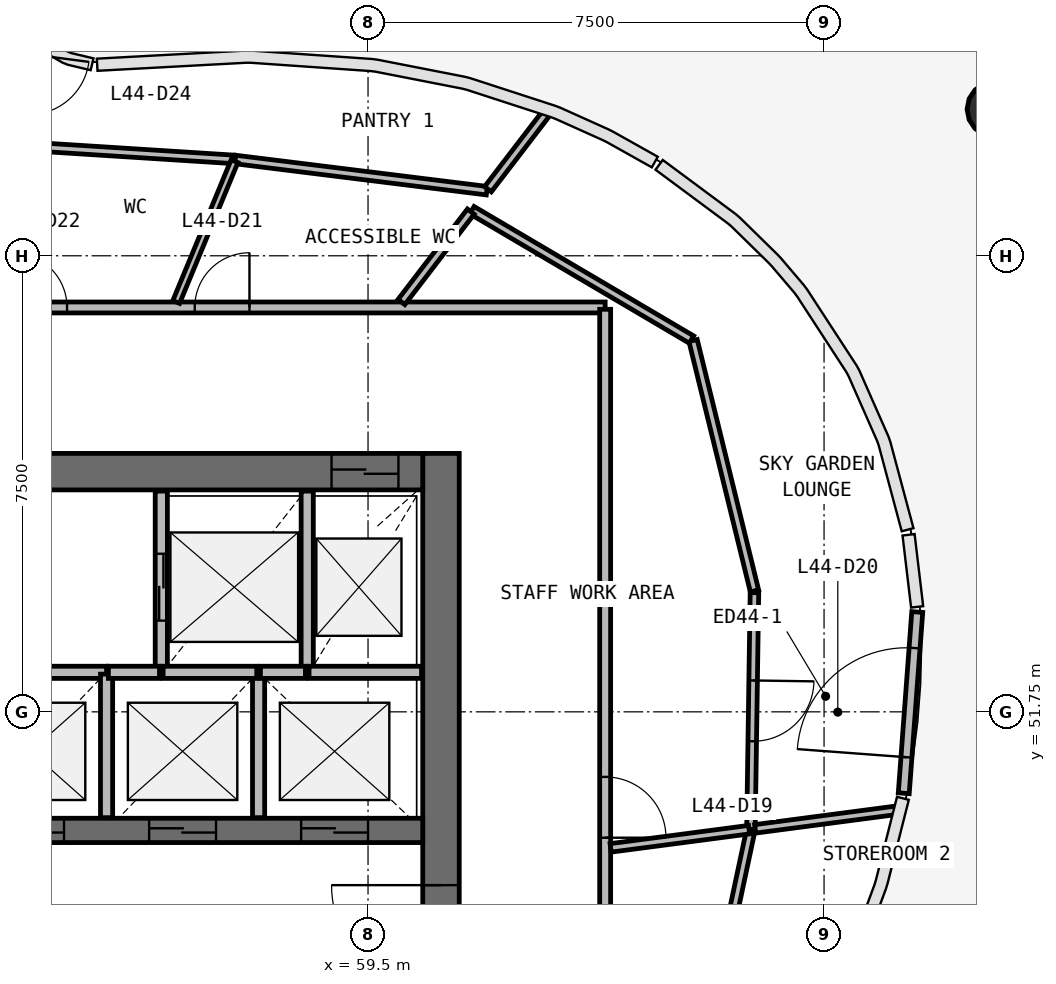
"""IFC4 building model, lengths in metres.
Left out: names, types, materials, properties, quantities, classifications, styles, units other than length and angle.
Written with IfcOpenShell. Run it as: python <this file> out.ifc"""

import sys

from ifc_helpers import new_model, si_unit, direction, frame, frame_2d, origin, origin_2d, place, context, subcontext, project, spatial, rectangle, circle, extrude, source, transform, mapped, element, fill, save


model = new_model("IFC4")
c1 = context("Model", 3, precision=1e-05, world=origin(), true_north=direction((0.0, 1.0)))
c2 = subcontext(c1, "Body", "Model", "MODEL_VIEW")
j1 = project(units=[si_unit("LENGTHUNIT", "METRE"), si_unit("PLANEANGLEUNIT", "RADIAN")], contexts=[c1])
p1 = place(None, origin())
s1 = spatial("IfcSite", under=j1, at=p1, CompositionType="ELEMENT")
p2 = place(p1, origin())
s2 = spatial("IfcBuilding", under=s1, at=p2, CompositionType="ELEMENT")
p3 = place(p2, frame((0.0, 0.0, 183.8)))
s3 = spatial("IfcBuildingStorey", under=s2, at=p3, CompositionType="ELEMENT", Elevation=183.8)
p4 = place(p3, frame((60.7, 40.0, 0.0), z_axis=(0.0, 0.0, 1.0), x_axis=(0.0, 1.0, 0.0)))
e1 = element("IfcWall", 1, at=p4, inside=s3, PredefinedType="SHEAR", context=c2, shape_type="SweptSolid", body=[
    extrude(rectangle(XDim=16.0, YDim=0.6, at=frame_2d((8.0, 0.0))), origin(), (0.0, 0.0, 1.0), 3.9),
])
p5 = place(p4, frame((7.1, 0.0, 0.0)))
e2 = element("IfcOpeningElement", 2, at=p5, cuts=e1, PredefinedType="OPENING", context=c2, shape_type="SweptSolid", body=[
    extrude(rectangle(XDim=1.8, YDim=2.1, at=frame_2d((0.9, 1.05))), frame((0.0, 0.31, 0.0), z_axis=(0.0, -1.0, 0.0), x_axis=(1.0, 0.0, 0.0)), (0.0, 0.0, 1.0), 0.62),
])
p6 = place(p3, frame((60.4, 55.7, 0.0), z_axis=(0.0, 0.0, 1.0), x_axis=(-1.0, 0.0, 0.0)))
e3 = element("IfcWall", 3, at=p6, inside=s3, PredefinedType="SHEAR", context=c2, shape_type="SweptSolid", body=[
    extrude(rectangle(XDim=16.8, YDim=0.6, at=frame_2d((8.4, 0.0))), origin(), (0.0, 0.0, 1.0), 3.9),
])
p7 = place(p6, frame((0.4, 0.0, 0.0)))
e4 = element("IfcOpeningElement", 4, at=p7, cuts=e3, PredefinedType="OPENING", context=c2, shape_type="SweptSolid", body=[
    extrude(rectangle(XDim=1.1, YDim=2.1, at=frame_2d((0.55, 1.05))), frame((0.0, 0.31, 0.0), z_axis=(0.0, -1.0, 0.0), x_axis=(1.0, 0.0, 0.0)), (0.0, 0.0, 1.0), 0.62),
])
p8 = place(p6, frame((10.3, 0.0, 0.0)))
e5 = element("IfcOpeningElement", 5, at=p8, cuts=e3, PredefinedType="OPENING", context=c2, shape_type="SweptSolid", body=[
    extrude(rectangle(XDim=1.2, YDim=2.1, at=frame_2d((0.6, 1.05))), frame((0.0, 0.31, 0.0), z_axis=(0.0, -1.0, 0.0), x_axis=(1.0, 0.0, 0.0)), (0.0, 0.0, 1.0), 0.62),
])
p9 = place(p6, frame((7.25, 0.0, 0.0)))
e6 = element("IfcOpeningElement", 6, at=p9, cuts=e3, PredefinedType="OPENING", context=c2, shape_type="SweptSolid", body=[
    extrude(rectangle(XDim=1.1, YDim=2.1, at=frame_2d((0.55, 1.05))), frame((0.0, 0.31, 0.0), z_axis=(0.0, -1.0, 0.0), x_axis=(1.0, 0.0, 0.0)), (0.0, 0.0, 1.0), 0.62),
])
p10 = place(p3, frame((43.6, 49.8, 0.0), z_axis=(0.0, 0.0, 1.0), x_axis=(1.0, 0.0, 0.0)))
e7 = element("IfcWall", 7, at=p10, inside=s3, PredefinedType="SHEAR", context=c2, shape_type="SweptSolid", body=[
    extrude(rectangle(XDim=16.8, YDim=0.4, at=frame_2d((8.4, 0.0))), origin(), (0.0, 0.0, 1.0), 3.9),
])
p11 = place(p10, frame((9.8, 0.0, 0.0)))
e8 = element("IfcOpeningElement", 8, at=p11, cuts=e7, PredefinedType="OPENING", context=c2, shape_type="SweptSolid", body=[
    extrude(rectangle(XDim=1.1, YDim=2.1, at=frame_2d((0.55, 1.05))), frame((0.0, 0.21, 0.0), z_axis=(0.0, -1.0, 0.0), x_axis=(1.0, 0.0, 0.0)), (0.0, 0.0, 1.0), 0.42),
])
p12 = place(p10, frame((12.3, 0.0, 0.0)))
e9 = element("IfcOpeningElement", 9, at=p12, cuts=e7, PredefinedType="OPENING", context=c2, shape_type="SweptSolid", body=[
    extrude(rectangle(XDim=1.1, YDim=2.1, at=frame_2d((0.55, 1.05))), frame((0.0, 0.21, 0.0), z_axis=(0.0, -1.0, 0.0), x_axis=(1.0, 0.0, 0.0)), (0.0, 0.0, 1.0), 0.42),
])
p13 = place(p10, frame((14.8, 0.0, 0.0)))
e10 = element("IfcOpeningElement", 10, at=p13, cuts=e7, PredefinedType="OPENING", context=c2, shape_type="SweptSolid", body=[
    extrude(rectangle(XDim=1.1, YDim=2.1, at=frame_2d((0.55, 1.05))), frame((0.0, 0.21, 0.0), z_axis=(0.0, -1.0, 0.0), x_axis=(1.0, 0.0, 0.0)), (0.0, 0.0, 1.0), 0.42),
])
p14 = place(p10, frame((4.45, 0.0, 0.0)))
e11 = element("IfcOpeningElement", 11, at=p14, cuts=e7, PredefinedType="OPENING", context=c2, shape_type="SweptSolid", body=[
    extrude(rectangle(XDim=0.9, YDim=2.1, at=frame_2d((0.45, 1.05))), frame((0.0, 0.21, 0.0), z_axis=(0.0, -1.0, 0.0), x_axis=(1.0, 0.0, 0.0)), (0.0, 0.0, 1.0), 0.42),
])
p15 = place(p10, frame((7.85, 0.0, 0.0)))
e12 = element("IfcOpeningElement", 12, at=p15, cuts=e7, PredefinedType="OPENING", context=c2, shape_type="SweptSolid", body=[
    extrude(rectangle(XDim=0.9, YDim=2.1, at=frame_2d((0.45, 1.05))), frame((0.0, 0.21, 0.0), z_axis=(0.0, -1.0, 0.0), x_axis=(1.0, 0.0, 0.0)), (0.0, 0.0, 1.0), 0.42),
])
m1 = source(origin(), c2, "Body", "SweptSolid", [
    extrude(circle(Radius=0.45, at=origin_2d()), origin(), (0.0, 0.0, 1.0), 4.22),
])
p16 = place(p3, frame((69.802, 61.66, -0.32), z_axis=(0.0, 0.0, 1.0), x_axis=(1.0, 0.0, 0.0)))
e13 = element("IfcColumn", 13, at=p16, inside=s3, PredefinedType="COLUMN", context=c2, shape_type="MappedRepresentation", body=[
    mapped(m1, transform((0.0, 0.0, 0.0), scale=1.0)),
])
p17 = place(p3, frame((68.311, 50.412, 0.0), z_axis=(0.0, 0.0, 1.0), x_axis=(0.074271967477, 0.997238023166, 0.0)))
e14 = element("IfcWall", 14, at=p17, inside=s3, PredefinedType="STANDARD", context=c2, shape_type="SweptSolid", body=[
    extrude(rectangle(XDim=2.988, YDim=0.18, at=frame_2d((1.494, 0.0))), origin(), (0.0, 0.0, 1.0), 3.58),
])
p18 = place(p17, frame((0.594, 0.0, 0.0)))
e15 = element("IfcOpeningElement", 15, at=p18, cuts=e14, PredefinedType="OPENING", context=c2, shape_type="SweptSolid", body=[
    extrude(rectangle(XDim=1.8, YDim=2.4, at=frame_2d((0.9, 1.2))), frame((0.0, 0.1, 0.0), z_axis=(0.0, -1.0, 0.0), x_axis=(1.0, 0.0, 0.0)), (0.0, 0.0, 1.0), 0.2),
])
p19 = place(p3, frame((56.1, 55.38, 0.0), z_axis=(0.0, 0.0, 1.0), x_axis=(0.0, -1.0, 0.0)))
e16 = element("IfcWall", 16, at=p19, inside=s3, PredefinedType="SOLIDWALL", context=c2, shape_type="SweptSolid", body=[
    extrude(rectangle(XDim=2.98, YDim=0.2, at=frame_2d((1.49, 0.0))), origin(), (0.0, 0.0, 1.0), 3.58),
])
p20 = place(p19, frame((1.03, 0.0, 0.0)))
e17 = element("IfcOpeningElement", 17, at=p20, cuts=e16, PredefinedType="OPENING", context=c2, shape_type="SweptSolid", body=[
    extrude(rectangle(XDim=1.1, YDim=2.1, at=frame_2d((0.55, 1.05))), frame((0.0, 0.11, 0.0), z_axis=(0.0, -1.0, 0.0), x_axis=(1.0, 0.0, 0.0)), (0.0, 0.0, 1.0), 0.22),
])
p21 = place(p3, frame((58.5, 52.4, 0.0), z_axis=(0.0, 0.0, 1.0), x_axis=(0.0, 1.0, 0.0)))
e18 = element("IfcWall", 18, at=p21, inside=s3, PredefinedType="SOLIDWALL", context=c2, shape_type="SweptSolid", body=[
    extrude(rectangle(XDim=2.98, YDim=0.2, at=frame_2d((1.49, 0.0))), origin(), (0.0, 0.0, 1.0), 3.58),
])
p22 = place(p3, frame((55.2, 52.4, 0.0), z_axis=(0.0, 0.0, 1.0), x_axis=(-1.0, 0.0, 0.0)))
e19 = element("IfcWall", 19, at=p22, inside=s3, PredefinedType="SOLIDWALL", context=c2, shape_type="SweptSolid", body=[
    extrude(rectangle(XDim=2.5, YDim=0.2, at=frame_2d((1.25, 0.0))), origin(), (0.0, 0.0, 1.0), 3.58),
])
p23 = place(p3, frame((55.2, 50.01, 0.0), z_axis=(0.0, 0.0, 1.0), x_axis=(0.0, 1.0, 0.0)))
e20 = element("IfcWall", 20, at=p23, inside=s3, PredefinedType="SOLIDWALL", context=c2, shape_type="SweptSolid", body=[
    extrude(rectangle(XDim=2.36, YDim=0.2, at=frame_2d((1.18, 0.0))), origin(), (0.0, 0.0, 1.0), 3.58),
])
p24 = place(p3, frame((57.7, 50.01, 0.0), z_axis=(0.0, 0.0, 1.0), x_axis=(0.0, 1.0, 0.0)))
e21 = element("IfcWall", 21, at=p24, inside=s3, PredefinedType="SOLIDWALL", context=c2, shape_type="SweptSolid", body=[
    extrude(rectangle(XDim=2.39, YDim=0.2, at=frame_2d((1.195, 0.0))), origin(), (0.0, 0.0, 1.0), 3.58),
])
p25 = place(p3, frame((60.38, 52.4, 0.0), z_axis=(0.0, 0.0, 1.0), x_axis=(-1.0, 0.0, 0.0)))
e22 = element("IfcWall", 22, at=p25, inside=s3, PredefinedType="SOLIDWALL", context=c2, shape_type="SweptSolid", body=[
    extrude(rectangle(XDim=1.85, YDim=0.2, at=frame_2d((0.925, 0.0))), origin(), (0.0, 0.0, 1.0), 3.58),
])
p26 = place(p3, frame((57.67, 52.4, 0.0), z_axis=(0.0, 0.0, 1.0), x_axis=(-1.0, 0.0, 0.0)))
e23 = element("IfcWall", 23, at=p26, inside=s3, PredefinedType="SOLIDWALL", context=c2, shape_type="SweptSolid", body=[
    extrude(rectangle(XDim=1.54, YDim=0.2, at=frame_2d((0.77, 0.0))), origin(), (0.0, 0.0, 1.0), 3.58),
])
p27 = place(p3, frame((56.07, 52.4, 0.0), z_axis=(0.0, 0.0, 1.0), x_axis=(-1.0, 0.0, 0.0)))
e24 = element("IfcWall", 24, at=p27, inside=s3, PredefinedType="SOLIDWALL", context=c2, shape_type="SweptSolid", body=[
    extrude(rectangle(XDim=0.84, YDim=0.2, at=frame_2d((0.42, 0.0))), origin(), (0.0, 0.0, 1.0), 3.58),
])
p28 = place(p3, frame((58.47, 52.4, 0.0), z_axis=(0.0, 0.0, 1.0), x_axis=(-1.0, 0.0, 0.0)))
e25 = element("IfcWall", 25, at=p28, inside=s3, PredefinedType="SOLIDWALL", context=c2, shape_type="SweptSolid", body=[
    extrude(rectangle(XDim=0.74, YDim=0.2, at=frame_2d((0.37, 0.0))), origin(), (0.0, 0.0, 1.0), 3.58),
])
p29 = place(p3, frame((40.6, 58.4, 0.0), z_axis=(0.0, 0.0, 1.0), x_axis=(1.0, 0.0, 0.0)))
e26 = element("IfcWall", 26, at=p29, inside=s3, PredefinedType="PARTITIONING", context=c2, shape_type="SweptSolid", body=[
    extrude(rectangle(XDim=22.8, YDim=0.18, at=frame_2d((11.4, 0.0))), origin(), (0.0, 0.0, 1.0), 2.88),
])
p30 = place(p29, frame((16.05, 0.0, 0.0)))
e27 = element("IfcOpeningElement", 27, at=p30, cuts=e26, PredefinedType="OPENING", context=c2, shape_type="SweptSolid", body=[
    extrude(rectangle(XDim=0.9, YDim=2.1, at=frame_2d((0.45, 1.05))), frame((0.0, 0.1, 0.0), z_axis=(0.0, -1.0, 0.0), x_axis=(1.0, 0.0, 0.0)), (0.0, 0.0, 1.0), 0.2),
])
p31 = place(p29, frame((13.05, 0.0, 0.0)))
e28 = element("IfcOpeningElement", 28, at=p31, cuts=e26, PredefinedType="OPENING", context=c2, shape_type="SweptSolid", body=[
    extrude(rectangle(XDim=0.9, YDim=2.1, at=frame_2d((0.45, 1.05))), frame((0.0, 0.1, 0.0), z_axis=(0.0, -1.0, 0.0), x_axis=(1.0, 0.0, 0.0)), (0.0, 0.0, 1.0), 0.2),
])
p32 = place(p29, frame((10.95, 0.0, 0.0)))
e29 = element("IfcOpeningElement", 29, at=p32, cuts=e26, PredefinedType="OPENING", context=c2, shape_type="SweptSolid", body=[
    extrude(rectangle(XDim=1.0, YDim=2.1, at=frame_2d((0.5, 1.05))), frame((0.0, 0.1, 0.0), z_axis=(0.0, -1.0, 0.0), x_axis=(1.0, 0.0, 0.0)), (0.0, 0.0, 1.0), 0.2),
])
p33 = place(p3, frame((63.4, 58.37, 0.0), z_axis=(0.0, 0.0, 1.0), x_axis=(0.0, -1.0, 0.0)))
e30 = element("IfcWall", 30, at=p33, inside=s3, PredefinedType="PARTITIONING", context=c2, shape_type="SweptSolid", body=[
    extrude(rectangle(XDim=20.74, YDim=0.18, at=frame_2d((10.37, 0.0))), origin(), (0.0, 0.0, 1.0), 2.88),
])
p34 = place(p33, frame((7.69, 0.0, 0.0)))
e31 = element("IfcOpeningElement", 31, at=p34, cuts=e30, PredefinedType="OPENING", context=c2, shape_type="SweptSolid", body=[
    extrude(rectangle(XDim=1.0, YDim=2.1, at=frame_2d((0.5, 1.05))), frame((0.0, 0.1, 0.0), z_axis=(0.0, -1.0, 0.0), x_axis=(1.0, 0.0, 0.0)), (0.0, 0.0, 1.0), 0.2),
])
p35 = place(p33, frame((9.89, 0.0, 0.0)))
e32 = element("IfcOpeningElement", 32, at=p35, cuts=e30, PredefinedType="OPENING", context=c2, shape_type="SweptSolid", body=[
    extrude(rectangle(XDim=1.0, YDim=2.1, at=frame_2d((0.5, 1.05))), frame((0.0, 0.1, 0.0), z_axis=(0.0, -1.0, 0.0), x_axis=(1.0, 0.0, 0.0)), (0.0, 0.0, 1.0), 0.2),
])
p36 = place(p3, frame((65.856, 53.739, 0.0), z_axis=(0.0, 0.0, 1.0), x_axis=(-0.23822460229, 0.971210089972, 0.0)))
e33 = element("IfcWall", 33, at=p36, inside=s3, PredefinedType="PARTITIONING", context=c2, shape_type="SweptSolid", body=[
    extrude(rectangle(XDim=4.24, YDim=0.14, at=frame_2d((2.12, 0.0))), origin(), (0.0, 0.0, 1.0), 2.88),
])
p37 = place(p3, frame((64.82, 57.872, 0.0), z_axis=(0.0, 0.0, 1.0), x_axis=(-0.861535732384, 0.507696938957, 0.0)))
e34 = element("IfcWall", 34, at=p37, inside=s3, PredefinedType="PARTITIONING", context=c2, shape_type="SweptSolid", body=[
    extrude(rectangle(XDim=4.192, YDim=0.14, at=frame_2d((2.096, 0.0))), origin(), (0.0, 0.0, 1.0), 2.88),
])
p38 = place(p3, frame((61.454, 60.321, 0.0), z_axis=(0.0, 0.0, 1.0), x_axis=(-0.99239722015, 0.123076226135, 0.0)))
e35 = element("IfcWall", 35, at=p38, inside=s3, PredefinedType="PARTITIONING", context=c2, shape_type="SweptSolid", body=[
    extrude(rectangle(XDim=4.17, YDim=0.14, at=frame_2d((2.085, 0.0))), origin(), (0.0, 0.0, 1.0), 2.88),
])
p39 = place(p3, frame((65.855, 53.709, 0.0), z_axis=(0.0, 0.0, 1.0), x_axis=(-0.014924646714, -0.999888621258, 0.0)))
e36 = element("IfcWall", 36, at=p39, inside=s3, PredefinedType="PARTITIONING", context=c2, shape_type="SweptSolid", body=[
    extrude(rectangle(XDim=3.893, YDim=0.14, at=frame_2d((1.947, 0.0))), origin(), (0.0, 0.0, 1.0), 2.88),
])
p40 = place(p39, frame((1.443, 0.0, 0.0)))
e37 = element("IfcOpeningElement", 37, at=p40, cuts=e36, PredefinedType="OPENING", context=c2, shape_type="SweptSolid", body=[
    extrude(rectangle(XDim=1.0, YDim=2.1, at=frame_2d((0.5, 1.05))), frame((0.0, 0.08, 0.0), z_axis=(0.0, -1.0, 0.0), x_axis=(1.0, 0.0, 0.0)), (0.0, 0.0, 1.0), 0.16),
])
p41 = place(p3, frame((65.791, 49.787, 0.0), z_axis=(0.0, 0.0, 1.0), x_axis=(-0.20840274736, -0.978043094599, 0.0)))
e38 = element("IfcWall", 38, at=p41, inside=s3, PredefinedType="PARTITIONING", context=c2, shape_type="SweptSolid", body=[
    extrude(rectangle(XDim=3.553, YDim=0.14, at=frame_2d((1.777, 0.0))), origin(), (0.0, 0.0, 1.0), 2.88),
])
p42 = place(p41, frame((1.303, 0.0, 0.0)))
e39 = element("IfcOpeningElement", 39, at=p42, cuts=e38, PredefinedType="OPENING", context=c2, shape_type="SweptSolid", body=[
    extrude(rectangle(XDim=1.0, YDim=2.1, at=frame_2d((0.5, 1.05))), frame((0.0, 0.08, 0.0), z_axis=(0.0, -1.0, 0.0), x_axis=(1.0, 0.0, 0.0)), (0.0, 0.0, 1.0), 0.16),
])
p43 = place(p3, frame((57.286, 60.836, 0.0), z_axis=(0.0, 0.0, 1.0), x_axis=(-0.997992577904, 0.063330991218, 0.0)))
e40 = element("IfcWall", 40, at=p43, inside=s3, PredefinedType="PARTITIONING", context=c2, shape_type="SweptSolid", body=[
    extrude(rectangle(XDim=3.573, YDim=0.14, at=frame_2d((1.787, 0.0))), origin(), (0.0, 0.0, 1.0), 2.88),
])
p44 = place(p3, frame((65.867, 49.826, 0.0), z_axis=(0.0, 0.0, 1.0), x_axis=(0.991441898965, 0.130548691974, 0.0)))
e41 = element("IfcWall", 41, at=p44, inside=s3, PredefinedType="PARTITIONING", context=c2, shape_type="SweptSolid", body=[
    extrude(rectangle(XDim=2.347, YDim=0.14, at=frame_2d((1.173, 0.0))), origin(), (0.0, 0.0, 1.0), 2.88),
])
p45 = place(p3, frame((63.49, 49.513, 0.0), z_axis=(0.0, 0.0, 1.0), x_axis=(0.991447421324, 0.130506745995, 0.0)))
e42 = element("IfcWall", 42, at=p45, inside=s3, PredefinedType="PARTITIONING", context=c2, shape_type="SweptSolid", body=[
    extrude(rectangle(XDim=2.297, YDim=0.14, at=frame_2d((1.148, 0.0))), origin(), (0.0, 0.0, 1.0), 2.88),
])
p46 = place(p3, frame((60.049, 58.49, 0.0), z_axis=(0.0, 0.0, 1.0), x_axis=(0.60874059601, 0.793369325579, 0.0)))
e43 = element("IfcWall", 43, at=p46, inside=s3, PredefinedType="PARTITIONING", context=c2, shape_type="SweptSolid", body=[
    extrude(rectangle(XDim=1.874, YDim=0.14, at=frame_2d((0.937, 0.0))), origin(), (0.0, 0.0, 1.0), 2.88),
])
p47 = place(p3, frame((61.472, 60.344, 0.0), z_axis=(0.0, 0.0, 1.0), x_axis=(0.608719514622, 0.793385500572, 0.0)))
e44 = element("IfcWall", 44, at=p47, inside=s3, PredefinedType="PARTITIONING", context=c2, shape_type="SweptSolid", body=[
    extrude(rectangle(XDim=1.584, YDim=0.14, at=frame_2d((0.792, 0.0))), origin(), (0.0, 0.0, 1.0), 2.88),
])
p48 = place(p3, frame((56.345, 58.49, 0.0), z_axis=(0.0, 0.0, 1.0), x_axis=(0.382664324241, 0.923887447124, 0.0)))
e45 = element("IfcWall", 45, at=p48, inside=s3, PredefinedType="PARTITIONING", context=c2, shape_type="SweptSolid", body=[
    extrude(rectangle(XDim=2.507, YDim=0.12, at=frame_2d((1.253, 0.0))), origin(), (0.0, 0.0, 1.0), 2.88),
])
m2 = source(origin(), c2, "Body", "SweptSolid", [
    extrude(rectangle(XDim=1.8, YDim=2.4, at=frame_2d((0.9, 1.2))), frame((0.0, 0.025, 0.0), z_axis=(0.0, -1.0, 0.0), x_axis=(1.0, 0.0, 0.0)), (0.0, 0.0, 1.0), 0.05),
])
p49 = place(p18, origin())
e46 = element("IfcDoor", 46, at=p49, inside=s3, OperationType="DOUBLE_DOOR_SINGLE_SWING", PredefinedType="DOOR", context=c2, shape_type="MappedRepresentation", body=[
    mapped(m2, transform((0.0, 0.0, 0.0), scale=1.0)),
])
fill(e15, e46)
m3 = source(origin(), c2, "Body", "SweptSolid", [
    extrude(rectangle(XDim=1.8, YDim=2.1, at=frame_2d((0.9, 1.05))), frame((0.0, 0.025, 0.0), z_axis=(0.0, -1.0, 0.0), x_axis=(1.0, 0.0, 0.0)), (0.0, 0.0, 1.0), 0.05),
])
p50 = place(p5, origin())
e47 = element("IfcDoor", 47, at=p50, inside=s3, OperationType="SINGLE_SWING_RIGHT", PredefinedType="DOOR", context=c2, shape_type="MappedRepresentation", body=[
    mapped(m3, transform((0.0, 0.0, 0.0), scale=1.0)),
])
fill(e2, e47)
m4 = source(origin(), c2, "Body", "SweptSolid", [
    extrude(rectangle(XDim=1.1, YDim=2.1, at=frame_2d((0.55, 1.05))), frame((0.0, 0.025, 0.0), z_axis=(0.0, -1.0, 0.0), x_axis=(1.0, 0.0, 0.0)), (0.0, 0.0, 1.0), 0.05),
])
p51 = place(p11, origin())
e48 = element("IfcDoor", 48, at=p51, inside=s3, OperationType="DOUBLE_DOOR_SLIDING", PredefinedType="USERDEFINED", context=c2, shape_type="MappedRepresentation", body=[
    mapped(m4, transform((0.0, 0.0, 0.0), scale=1.0)),
])
fill(e8, e48)
p52 = place(p12, origin())
e49 = element("IfcDoor", 49, at=p52, inside=s3, OperationType="DOUBLE_DOOR_SLIDING", PredefinedType="USERDEFINED", context=c2, shape_type="MappedRepresentation", body=[
    mapped(m4, transform((0.0, 0.0, 0.0), scale=1.0)),
])
fill(e9, e49)
p53 = place(p13, origin())
e50 = element("IfcDoor", 50, at=p53, inside=s3, OperationType="DOUBLE_DOOR_SLIDING", PredefinedType="USERDEFINED", context=c2, shape_type="MappedRepresentation", body=[
    mapped(m4, transform((0.0, 0.0, 0.0), scale=1.0)),
])
fill(e10, e50)
p54 = place(p20, origin())
e51 = element("IfcDoor", 51, at=p54, inside=s3, OperationType="DOUBLE_DOOR_SLIDING", PredefinedType="USERDEFINED", context=c2, shape_type="MappedRepresentation", body=[
    mapped(m4, transform((0.0, 0.0, 0.0), scale=1.0)),
])
fill(e17, e51)
p55 = place(p7, origin())
e52 = element("IfcDoor", 52, at=p55, inside=s3, OperationType="DOUBLE_DOOR_SLIDING", PredefinedType="USERDEFINED", context=c2, shape_type="MappedRepresentation", body=[
    mapped(m4, transform((0.0, 0.0, 0.0), scale=1.0)),
])
fill(e4, e52)
m5 = source(origin(), c2, "Body", "SweptSolid", [
    extrude(rectangle(XDim=1.0, YDim=2.1, at=frame_2d((0.5, 1.05))), frame((0.0, 0.025, 0.0), z_axis=(0.0, -1.0, 0.0), x_axis=(1.0, 0.0, 0.0)), (0.0, 0.0, 1.0), 0.05),
])
p56 = place(p34, origin())
e53 = element("IfcDoor", 53, at=p56, inside=s3, OperationType="SINGLE_SWING_RIGHT", PredefinedType="DOOR", context=c2, shape_type="MappedRepresentation", body=[
    mapped(m5, transform((0.0, 0.0, 0.0), scale=1.0)),
])
fill(e31, e53)
p57 = place(p40, origin())
e54 = element("IfcDoor", 54, at=p57, inside=s3, OperationType="SINGLE_SWING_LEFT", PredefinedType="DOOR", context=c2, shape_type="MappedRepresentation", body=[
    mapped(m5, transform((0.0, 0.0, 0.0), scale=1.0)),
])
fill(e37, e54)
m6 = source(origin(), c2, "Body", "SweptSolid", [
    extrude(rectangle(XDim=0.9, YDim=2.1, at=frame_2d((0.45, 1.05))), frame((0.0, 0.025, 0.0), z_axis=(0.0, -1.0, 0.0), x_axis=(1.0, 0.0, 0.0)), (0.0, 0.0, 1.0), 0.05),
])
p58 = place(p30, origin())
e55 = element("IfcDoor", 55, at=p58, inside=s3, OperationType="SINGLE_SWING_RIGHT", PredefinedType="DOOR", context=c2, shape_type="MappedRepresentation", body=[
    mapped(m6, transform((0.0, 0.0, 0.0), scale=1.0)),
])
fill(e27, e55)
p59 = place(p31, origin())
e56 = element("IfcDoor", 56, at=p59, inside=s3, OperationType="SINGLE_SWING_LEFT", PredefinedType="DOOR", context=c2, shape_type="MappedRepresentation", body=[
    mapped(m6, transform((0.0, 0.0, 0.0), scale=1.0)),
])
fill(e28, e56)
save(model, sys.argv[1])
